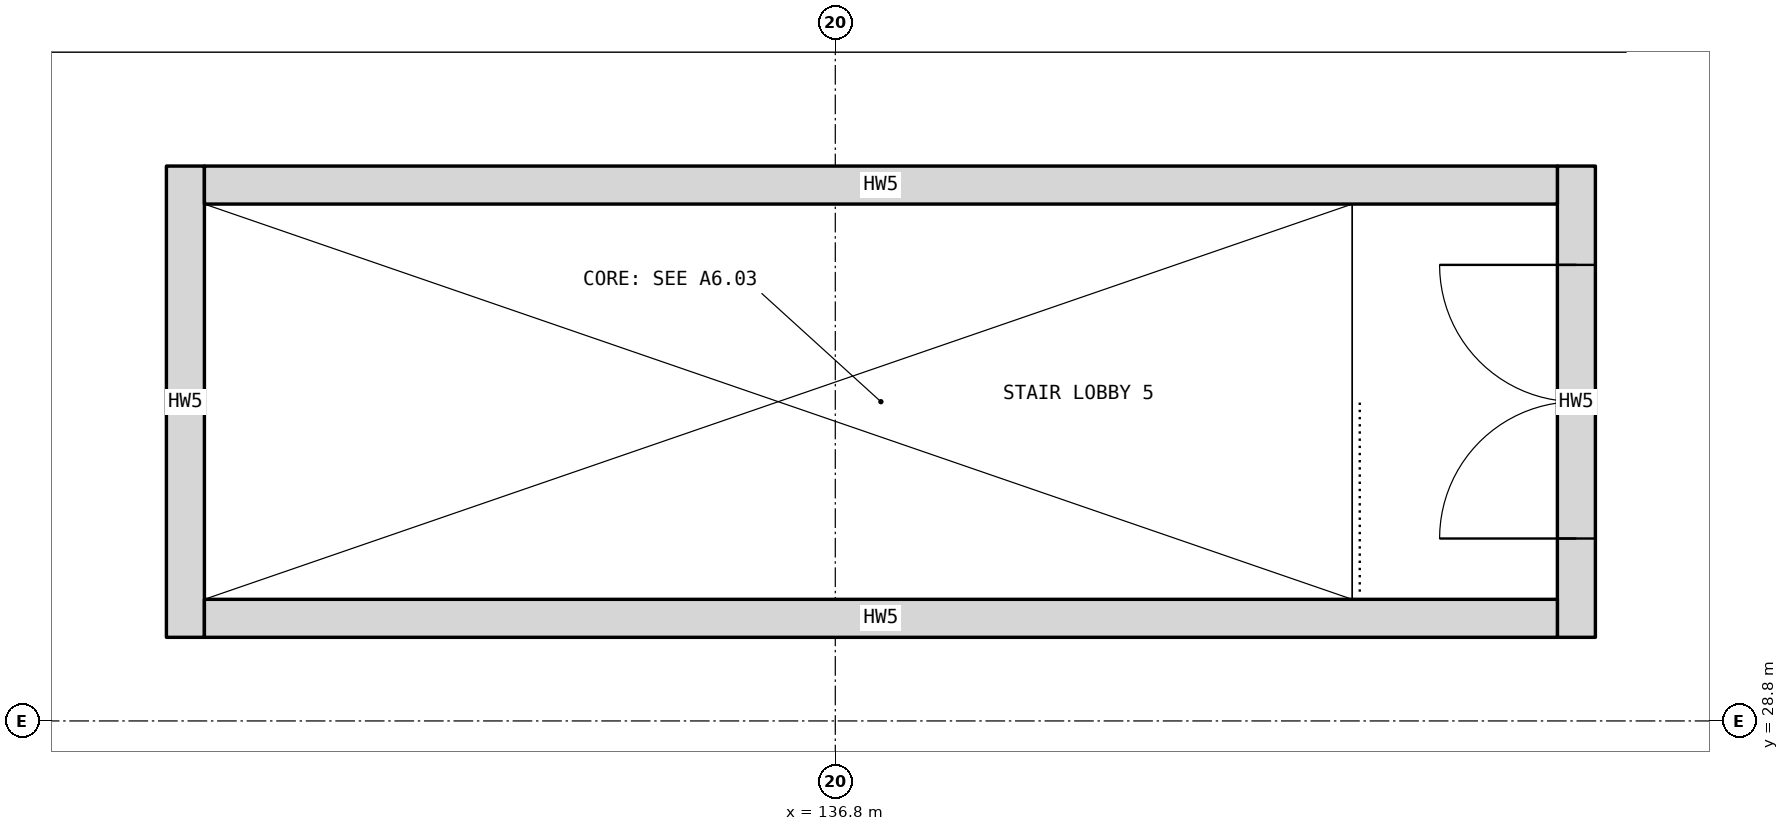
"""IFC4 building model, lengths in metres.
Left out: names, types, materials, properties, quantities, classifications, styles, units other than length and angle.
Written with IfcOpenShell. Run it as: python <this file> out.ifc"""

import sys

from ifc_helpers import new_model, si_unit, direction, frame, frame_2d, origin, place, context, subcontext, project, spatial, rectangle, extrude, element, fill, save


model = new_model("IFC4")
c1 = context("Model", 3, precision=1e-05, world=origin(), true_north=direction((0.0, 1.0)))
c2 = subcontext(c1, "Body", "Model", "MODEL_VIEW")
j1 = project(units=[si_unit("LENGTHUNIT", "METRE"), si_unit("PLANEANGLEUNIT", "RADIAN")], contexts=[c1])
p1 = place(None, origin())
s1 = spatial("IfcSite", under=j1, at=p1, CompositionType="ELEMENT")
p2 = place(p1, origin())
s2 = spatial("IfcBuilding", under=s1, at=p2, CompositionType="ELEMENT")
p3 = place(p2, origin())
s3 = spatial("IfcBuildingStorey", under=s2, at=p3, CompositionType="ELEMENT", Elevation=0.0)
p4 = place(p3, frame((132.525, 29.35, 0.0), z_axis=(0.0, 0.0, 1.0), x_axis=(0.0, 1.0, 0.0)))
e1 = element("IfcWall", 1, at=p4, inside=s3, PredefinedType="SOLIDWALL", context=c2, shape_type="SweptSolid", body=[
    extrude(rectangle(XDim=3.1, YDim=0.25, at=frame_2d((1.55, 0.0))), origin(), (0.0, 0.0, 1.0), 3.2),
])
p5 = place(p3, frame((141.675, 29.35, 0.0), z_axis=(0.0, 0.0, 1.0), x_axis=(0.0, 1.0, 0.0)))
e2 = element("IfcWall", 2, at=p5, inside=s3, PredefinedType="SOLIDWALL", context=c2, shape_type="SweptSolid", body=[
    extrude(rectangle(XDim=3.1, YDim=0.25, at=frame_2d((1.55, 0.0))), origin(), (0.0, 0.0, 1.0), 3.2),
])
p6 = place(p5, frame((0.65, 0.0, 0.0)))
e3 = element("IfcOpeningElement", 3, at=p6, cuts=e2, PredefinedType="OPENING", context=c2, shape_type="SweptSolid", body=[
    extrude(rectangle(XDim=1.8, YDim=2.1, at=frame_2d((0.9, 1.05))), frame((0.0, 0.135, 0.0), z_axis=(0.0, -1.0, 0.0), x_axis=(1.0, 0.0, 0.0)), (0.0, 0.0, 1.0), 0.27),
])
for number, where, z_axis, x_axis in (
    (4, (132.65, 29.475, 0.0), (0.0, 0.0, 1.0), (1.0, 0.0, 0.0)),
    (5, (132.65, 32.325, 0.0), (0.0, 0.0, 1.0), (1.0, 0.0, 0.0)),
):
    element("IfcWall", number, at=place(p3, frame(where, z_axis=z_axis, x_axis=x_axis)), inside=s3, PredefinedType="SOLIDWALL", context=c2, shape_type="SweptSolid", body=[
        extrude(rectangle(XDim=8.9, YDim=0.25, at=frame_2d((4.45, 0.0))), origin(), (0.0, 0.0, 1.0), 3.2),
    ])
p7 = place(p6, origin())
e6 = element("IfcDoor", 6, at=p7, inside=s3, OperationType="DOUBLE_DOOR_SINGLE_SWING", PredefinedType="DOOR", context=c2, shape_type="SweptSolid", body=[
    extrude(rectangle(XDim=1.8, YDim=2.1, at=frame_2d((0.9, 1.05))), frame((0.0, 0.025, 0.0), z_axis=(0.0, -1.0, 0.0), x_axis=(1.0, 0.0, 0.0)), (0.0, 0.0, 1.0), 0.05),
])
fill(e3, e6)
save(model, sys.argv[1])
